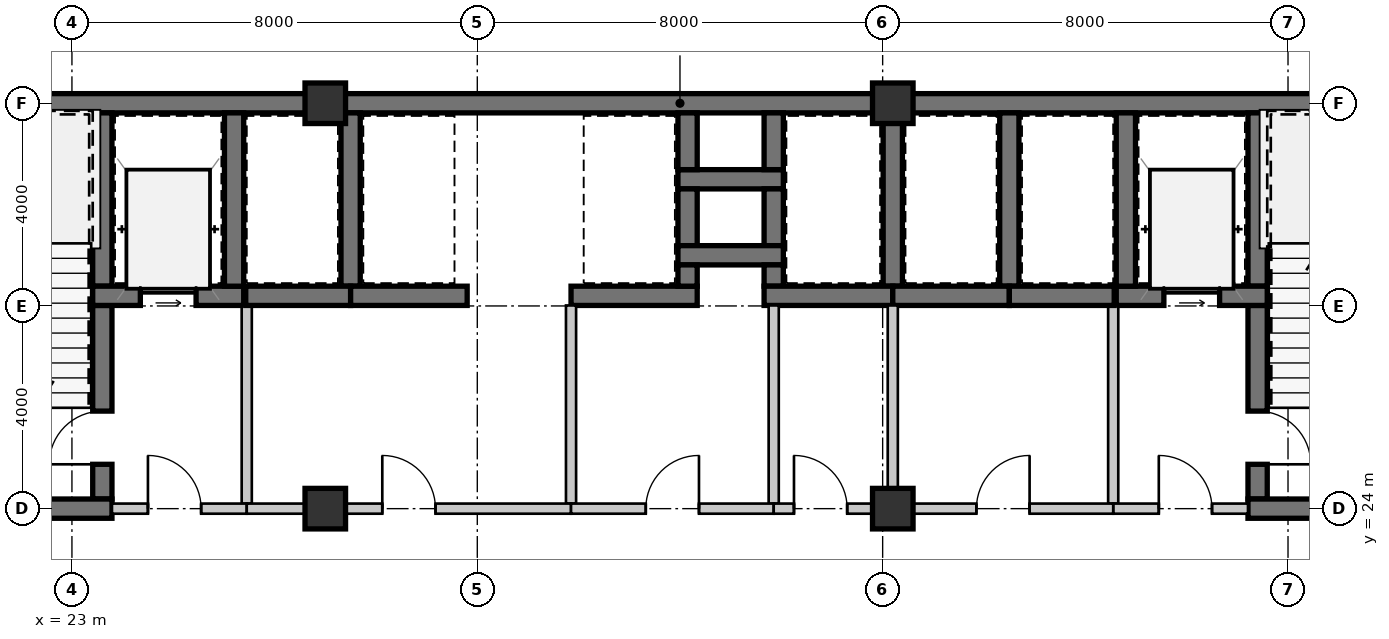
"""IFC4 building model, lengths in metres.
Left out: names, types, materials, properties, quantities, classifications, styles, units other than length and angle.
Written with IfcOpenShell. Run it as: python <this file> out.ifc"""

import sys

from ifc_helpers import new_model, si_unit, direction, frame, frame_2d, origin, origin_2d, place, context, subcontext, project, spatial, rectangle, extrude, source, transform, mapped, element, fill, save


model = new_model("IFC4")
c1 = context("Model", 3, precision=1e-05, world=origin(), true_north=direction((0.0, 1.0)))
c2 = subcontext(c1, "Body", "Model", "MODEL_VIEW")
j1 = project(units=[si_unit("LENGTHUNIT", "METRE"), si_unit("PLANEANGLEUNIT", "RADIAN")], contexts=[c1])
p1 = place(None, origin())
s1 = spatial("IfcSite", under=j1, at=p1, CompositionType="ELEMENT")
p2 = place(p1, origin())
s2 = spatial("IfcBuilding", under=s1, at=p2, CompositionType="ELEMENT")
p3 = place(p2, frame((0.0, 0.0, 60.9)))
s3 = spatial("IfcBuildingStorey", under=s2, at=p3, CompositionType="ELEMENT", Elevation=60.9)
m1 = source(origin(), c2, "Body", "SweptSolid", [
    extrude(rectangle(XDim=0.8, YDim=0.8, at=origin_2d()), origin(), (0.0, 0.0, 1.0), 4.2),
])
for number, where, z_axis, x_axis in (
    (1, (28.0, 24.0, 0.0), (0.0, 0.0, 1.0), (1.0, 0.0, 0.0)),
    (2, (39.2, 24.0, 0.0), (0.0, 0.0, 1.0), (1.0, 0.0, 0.0)),
    (3, (28.0, 32.0, 0.0), (0.0, 0.0, 1.0), (1.0, 0.0, 0.0)),
    (4, (39.2, 32.0, 0.0), (0.0, 0.0, 1.0), (1.0, 0.0, 0.0)),
):
    element("IfcColumn", number, at=place(p3, frame(where, z_axis=z_axis, x_axis=x_axis)), inside=s3, PredefinedType="COLUMN", context=c2, shape_type="MappedRepresentation", body=[
        mapped(m1, transform((0.0, 0.0, 0.0), scale=1.0)),
    ])
m2 = source(origin(), c2, "Body", "SweptSolid", [
    extrude(rectangle(XDim=9.19, YDim=0.38, at=frame_2d((4.595, 0.0))), origin(), (0.0, 0.0, 1.0), 3.78),
])
p4 = place(p3, frame((18.81, 32.0, 0.0), z_axis=(0.0, 0.0, 1.0), x_axis=(1.0, 0.0, 0.0)))
e5 = element("IfcWall", 5, at=p4, inside=s3, PredefinedType="SHEAR", context=c2, shape_type="MappedRepresentation", body=[
    mapped(m2, transform((0.0, 0.0, 0.0), scale=1.0)),
])
m3 = source(origin(), c2, "Body", "SweptSolid", [
    extrude(rectangle(XDim=11.2, YDim=0.38, at=frame_2d((5.6, 0.0))), origin(), (0.0, 0.0, 1.0), 3.78),
])
p5 = place(p3, frame((28.0, 32.0, 0.0), z_axis=(0.0, 0.0, 1.0), x_axis=(1.0, 0.0, 0.0)))
e6 = element("IfcWall", 6, at=p5, inside=s3, PredefinedType="SHEAR", context=c2, shape_type="MappedRepresentation", body=[
    mapped(m3, transform((0.0, 0.0, 0.0), scale=1.0)),
])
m4 = source(origin(), c2, "Body", "SweptSolid", [
    extrude(rectangle(XDim=11.99, YDim=0.38, at=frame_2d((5.995, 0.0))), origin(), (0.0, 0.0, 1.0), 3.78),
])
p6 = place(p3, frame((39.2, 32.0, 0.0), z_axis=(0.0, 0.0, 1.0), x_axis=(1.0, 0.0, 0.0)))
e7 = element("IfcWall", 7, at=p6, inside=s3, PredefinedType="SHEAR", context=c2, shape_type="MappedRepresentation", body=[
    mapped(m4, transform((0.0, 0.0, 0.0), scale=1.0)),
])
m5 = source(origin(), c2, "Body", "SweptSolid", [
    extrude(rectangle(XDim=3.42, YDim=0.38, at=frame_2d((1.71, 0.0))), origin(), (0.0, 0.0, 1.0), 3.78),
])
p7 = place(p3, frame((23.6, 28.39, 0.0), z_axis=(0.0, 0.0, 1.0), x_axis=(0.0, 1.0, 0.0)))
e8 = element("IfcWall", 8, at=p7, inside=s3, PredefinedType="SHEAR", context=c2, shape_type="MappedRepresentation", body=[
    mapped(m5, transform((0.0, 0.0, 0.0), scale=1.0)),
])
m6 = source(origin(), c2, "Body", "SweptSolid", [
    extrude(rectangle(XDim=3.82, YDim=0.38, at=frame_2d((1.91, 0.0))), origin(), (0.0, 0.0, 1.0), 3.78),
])
p8 = place(p3, frame((23.6, 24.19, 0.0), z_axis=(0.0, 0.0, 1.0), x_axis=(0.0, 1.0, 0.0)))
e9 = element("IfcWall", 9, at=p8, inside=s3, PredefinedType="SHEAR", context=c2, shape_type="MappedRepresentation", body=[
    mapped(m6, transform((0.0, 0.0, 0.0), scale=1.0)),
])
m7 = source(origin(), c2, "Body", "SweptSolid", [
    extrude(rectangle(XDim=1.05, YDim=2.1, at=frame_2d((0.525, 1.05))), frame((0.0, 0.2, 0.0), z_axis=(0.0, -1.0, 0.0), x_axis=(1.0, 0.0, 0.0)), (0.0, 0.0, 1.0), 0.4),
])
p9 = place(p8, frame((0.685, 0.0, 0.0)))
e10 = element("IfcOpeningElement", 10, at=p9, cuts=e9, PredefinedType="OPENING", context=c2, shape_type="MappedRepresentation", body=[
    mapped(m7, transform((0.0, 0.0, 0.0), scale=1.0)),
])
m8 = source(origin(), c2, "Body", "SweptSolid", [
    extrude(rectangle(XDim=4.98, YDim=0.38, at=frame_2d((2.49, 0.0))), origin(), (0.0, 0.0, 1.0), 3.78),
])
p10 = place(p3, frame((18.81, 24.0, 0.0), z_axis=(0.0, 0.0, 1.0), x_axis=(1.0, 0.0, 0.0)))
e11 = element("IfcWall", 11, at=p10, inside=s3, PredefinedType="SHEAR", context=c2, shape_type="MappedRepresentation", body=[
    mapped(m8, transform((0.0, 0.0, 0.0), scale=1.0)),
])
m9 = source(origin(), c2, "Body", "SweptSolid", [
    extrude(rectangle(XDim=2.98, YDim=0.38, at=frame_2d((1.49, 0.0))), origin(), (0.0, 0.0, 1.0), 3.78),
])
p11 = place(p3, frame((23.41, 28.2, 0.0), z_axis=(0.0, 0.0, 1.0), x_axis=(1.0, 0.0, 0.0)))
e12 = element("IfcWall", 12, at=p11, inside=s3, PredefinedType="SHEAR", context=c2, shape_type="MappedRepresentation", body=[
    mapped(m9, transform((0.0, 0.0, 0.0), scale=1.0)),
])
m10 = source(origin(), c2, "Body", "SweptSolid", [
    extrude(rectangle(XDim=1.1, YDim=2.15, at=frame_2d((0.55, 1.075))), frame((0.0, 0.2, 0.0), z_axis=(0.0, -1.0, 0.0), x_axis=(1.0, 0.0, 0.0)), (0.0, 0.0, 1.0), 0.4),
])
p12 = place(p11, frame((0.94, 0.0, 0.0)))
e13 = element("IfcOpeningElement", 13, at=p12, cuts=e12, PredefinedType="OPENING", context=c2, shape_type="MappedRepresentation", body=[
    mapped(m10, transform((0.0, 0.0, 0.0), scale=1.0)),
])
p13 = place(p3, frame((26.2, 28.39, 0.0), z_axis=(0.0, 0.0, 1.0), x_axis=(0.0, 1.0, 0.0)))
e14 = element("IfcWall", 14, at=p13, inside=s3, PredefinedType="SHEAR", context=c2, shape_type="MappedRepresentation", body=[
    mapped(m5, transform((0.0, 0.0, 0.0), scale=1.0)),
])
m11 = source(origin(), c2, "Body", "SweptSolid", [
    extrude(rectangle(XDim=3.91, YDim=0.2, at=frame_2d((1.955, 0.0))), origin(), (0.0, 0.0, 1.0), 3.78),
])
p14 = place(p3, frame((26.45, 24.1, 0.0), z_axis=(0.0, 0.0, 1.0), x_axis=(0.0, 1.0, 0.0)))
e15 = element("IfcWall", 15, at=p14, inside=s3, PredefinedType="SOLIDWALL", context=c2, shape_type="MappedRepresentation", body=[
    mapped(m11, transform((0.0, 0.0, 0.0), scale=1.0)),
])
m12 = source(origin(), c2, "Body", "SweptSolid", [
    extrude(rectangle(XDim=2.66, YDim=0.2, at=frame_2d((1.33, 0.0))), origin(), (0.0, 0.0, 1.0), 3.32),
])
p15 = place(p3, frame((23.79, 24.0, 0.0), z_axis=(0.0, 0.0, 1.0), x_axis=(1.0, 0.0, 0.0)))
e16 = element("IfcWall", 16, at=p15, inside=s3, PredefinedType="SOLIDWALL", context=c2, shape_type="MappedRepresentation", body=[
    mapped(m12, transform((0.0, 0.0, 0.0), scale=1.0)),
])
m13 = source(origin(), c2, "Body", "SweptSolid", [
    extrude(rectangle(XDim=1.05, YDim=2.1, at=frame_2d((0.525, 1.05))), frame((0.0, 0.11, 0.0), z_axis=(0.0, -1.0, 0.0), x_axis=(1.0, 0.0, 0.0)), (0.0, 0.0, 1.0), 0.22),
])
p16 = place(p15, frame((0.71, 0.0, 0.0)))
e17 = element("IfcOpeningElement", 17, at=p16, cuts=e16, PredefinedType="OPENING", context=c2, shape_type="MappedRepresentation", body=[
    mapped(m13, transform((0.0, 0.0, 0.0), scale=1.0)),
])
p17 = place(p3, frame((46.4, 31.81, 0.0), z_axis=(0.0, 0.0, 1.0), x_axis=(0.0, -1.0, 0.0)))
e18 = element("IfcWall", 18, at=p17, inside=s3, PredefinedType="SHEAR", context=c2, shape_type="MappedRepresentation", body=[
    mapped(m5, transform((0.0, 0.0, 0.0), scale=1.0)),
])
p18 = place(p3, frame((46.4, 28.01, 0.0), z_axis=(0.0, 0.0, 1.0), x_axis=(0.0, -1.0, 0.0)))
e19 = element("IfcWall", 19, at=p18, inside=s3, PredefinedType="SHEAR", context=c2, shape_type="MappedRepresentation", body=[
    mapped(m6, transform((0.0, 0.0, 0.0), scale=1.0)),
])
p19 = place(p18, frame((2.085, 0.0, 0.0)))
e20 = element("IfcOpeningElement", 20, at=p19, cuts=e19, PredefinedType="OPENING", context=c2, shape_type="MappedRepresentation", body=[
    mapped(m7, transform((0.0, 0.0, 0.0), scale=1.0)),
])
p20 = place(p3, frame((46.21, 24.0, 0.0), z_axis=(0.0, 0.0, 1.0), x_axis=(1.0, 0.0, 0.0)))
e21 = element("IfcWall", 21, at=p20, inside=s3, PredefinedType="SHEAR", context=c2, shape_type="MappedRepresentation", body=[
    mapped(m8, transform((0.0, 0.0, 0.0), scale=1.0)),
])
p21 = place(p3, frame((43.61, 28.2, 0.0), z_axis=(0.0, 0.0, 1.0), x_axis=(1.0, 0.0, 0.0)))
e22 = element("IfcWall", 22, at=p21, inside=s3, PredefinedType="SHEAR", context=c2, shape_type="MappedRepresentation", body=[
    mapped(m9, transform((0.0, 0.0, 0.0), scale=1.0)),
])
p22 = place(p21, frame((0.94, 0.0, 0.0)))
e23 = element("IfcOpeningElement", 23, at=p22, cuts=e22, PredefinedType="OPENING", context=c2, shape_type="MappedRepresentation", body=[
    mapped(m10, transform((0.0, 0.0, 0.0), scale=1.0)),
])
p23 = place(p3, frame((43.8, 31.81, 0.0), z_axis=(0.0, 0.0, 1.0), x_axis=(0.0, -1.0, 0.0)))
e24 = element("IfcWall", 24, at=p23, inside=s3, PredefinedType="SHEAR", context=c2, shape_type="MappedRepresentation", body=[
    mapped(m5, transform((0.0, 0.0, 0.0), scale=1.0)),
])
p24 = place(p3, frame((43.55, 28.01, 0.0), z_axis=(0.0, 0.0, 1.0), x_axis=(0.0, -1.0, 0.0)))
e25 = element("IfcWall", 25, at=p24, inside=s3, PredefinedType="SOLIDWALL", context=c2, shape_type="MappedRepresentation", body=[
    mapped(m11, transform((0.0, 0.0, 0.0), scale=1.0)),
])
m14 = source(origin(), c2, "Body", "SweptSolid", [
    extrude(rectangle(XDim=2.66, YDim=0.2, at=frame_2d((1.33, 0.0))), origin(), (0.0, 0.0, 1.0), 3.247),
])
p25 = place(p3, frame((43.55, 24.0, 0.0), z_axis=(0.0, 0.0, 1.0), x_axis=(1.0, 0.0, 0.0)))
e26 = element("IfcWall", 26, at=p25, inside=s3, PredefinedType="SOLIDWALL", context=c2, shape_type="MappedRepresentation", body=[
    mapped(m14, transform((0.0, 0.0, 0.0), scale=1.0)),
])
p26 = place(p25, frame((0.9, 0.0, 0.0)))
e27 = element("IfcOpeningElement", 27, at=p26, cuts=e26, PredefinedType="OPENING", context=c2, shape_type="MappedRepresentation", body=[
    mapped(m13, transform((0.0, 0.0, 0.0), scale=1.0)),
])
m15 = source(origin(), c2, "Body", "SweptSolid", [
    extrude(rectangle(XDim=2.08, YDim=0.38, at=frame_2d((1.04, 0.0))), origin(), (0.0, 0.0, 1.0), 3.78),
])
p27 = place(p3, frame((34.96, 30.5, 0.0), z_axis=(0.0, 0.0, 1.0), x_axis=(1.0, 0.0, 0.0)))
e28 = element("IfcWall", 28, at=p27, inside=s3, PredefinedType="SHEAR", context=c2, shape_type="MappedRepresentation", body=[
    mapped(m15, transform((0.0, 0.0, 0.0), scale=1.0)),
])
m16 = source(origin(), c2, "Body", "SweptSolid", [
    extrude(rectangle(XDim=1.12, YDim=0.38, at=frame_2d((0.56, 0.0))), origin(), (0.0, 0.0, 1.0), 3.78),
])
for number, where, z_axis, x_axis in (
    (29, (35.15, 31.81, 0.0), (0.0, 0.0, 1.0), (0.0, -1.0, 0.0)),
    (30, (36.85, 30.69, 0.0), (0.0, 0.0, 1.0), (0.0, 1.0, 0.0)),
    (31, (35.15, 30.31, 0.0), (0.0, 0.0, 1.0), (0.0, -1.0, 0.0)),
    (32, (36.85, 29.19, 0.0), (0.0, 0.0, 1.0), (0.0, 1.0, 0.0)),
):
    element("IfcWall", number, at=place(p3, frame(where, z_axis=z_axis, x_axis=x_axis)), inside=s3, PredefinedType="SHEAR", context=c2, shape_type="MappedRepresentation", body=[
        mapped(m16, transform((0.0, 0.0, 0.0), scale=1.0)),
    ])
p28 = place(p3, frame((34.96, 29.0, 0.0), z_axis=(0.0, 0.0, 1.0), x_axis=(1.0, 0.0, 0.0)))
e33 = element("IfcWall", 33, at=p28, inside=s3, PredefinedType="SHEAR", context=c2, shape_type="MappedRepresentation", body=[
    mapped(m15, transform((0.0, 0.0, 0.0), scale=1.0)),
])
p29 = place(p3, frame((28.5, 28.39, 0.0), z_axis=(0.0, 0.0, 1.0), x_axis=(0.0, 1.0, 0.0)))
e34 = element("IfcWall", 34, at=p29, inside=s3, PredefinedType="SHEAR", context=c2, shape_type="MappedRepresentation", body=[
    mapped(m5, transform((0.0, 0.0, 0.0), scale=1.0)),
])
m17 = source(origin(), c2, "Body", "SweptSolid", [
    extrude(rectangle(XDim=2.07, YDim=0.38, at=frame_2d((1.035, 0.0))), origin(), (0.0, 0.0, 1.0), 3.78),
])
p30 = place(p3, frame((26.43, 28.2, 0.0), z_axis=(0.0, 0.0, 1.0), x_axis=(1.0, 0.0, 0.0)))
e35 = element("IfcWall", 35, at=p30, inside=s3, PredefinedType="SHEAR", context=c2, shape_type="MappedRepresentation", body=[
    mapped(m17, transform((0.0, 0.0, 0.0), scale=1.0)),
])
m18 = source(origin(), c2, "Body", "SweptSolid", [
    extrude(rectangle(XDim=2.3, YDim=0.38, at=frame_2d((1.15, 0.0))), origin(), (0.0, 0.0, 1.0), 3.78),
])
p31 = place(p3, frame((28.5, 28.2, 0.0), z_axis=(0.0, 0.0, 1.0), x_axis=(1.0, 0.0, 0.0)))
e36 = element("IfcWall", 36, at=p31, inside=s3, PredefinedType="SHEAR", context=c2, shape_type="MappedRepresentation", body=[
    mapped(m18, transform((0.0, 0.0, 0.0), scale=1.0)),
])
m19 = source(origin(), c2, "Body", "SweptSolid", [
    extrude(rectangle(XDim=2.49, YDim=0.38, at=frame_2d((1.245, 0.0))), origin(), (0.0, 0.0, 1.0), 3.78),
])
p32 = place(p3, frame((32.85, 28.2, 0.0), z_axis=(0.0, 0.0, 1.0), x_axis=(1.0, 0.0, 0.0)))
e37 = element("IfcWall", 37, at=p32, inside=s3, PredefinedType="SHEAR", context=c2, shape_type="MappedRepresentation", body=[
    mapped(m19, transform((0.0, 0.0, 0.0), scale=1.0)),
])
m20 = source(origin(), c2, "Body", "SweptSolid", [
    extrude(rectangle(XDim=0.42, YDim=0.38, at=frame_2d((0.21, 0.0))), origin(), (0.0, 0.0, 1.0), 3.78),
])
p33 = place(p3, frame((35.15, 28.39, 0.0), z_axis=(0.0, 0.0, 1.0), x_axis=(0.0, 1.0, 0.0)))
e38 = element("IfcWall", 38, at=p33, inside=s3, PredefinedType="SHEAR", context=c2, shape_type="MappedRepresentation", body=[
    mapped(m20, transform((0.0, 0.0, 0.0), scale=1.0)),
])
p34 = place(p3, frame((39.2, 28.39, 0.0), z_axis=(0.0, 0.0, 1.0), x_axis=(0.0, 1.0, 0.0)))
e39 = element("IfcWall", 39, at=p34, inside=s3, PredefinedType="SHEAR", context=c2, shape_type="MappedRepresentation", body=[
    mapped(m5, transform((0.0, 0.0, 0.0), scale=1.0)),
])
p35 = place(p3, frame((36.85, 28.81, 0.0), z_axis=(0.0, 0.0, 1.0), x_axis=(0.0, -1.0, 0.0)))
e40 = element("IfcWall", 40, at=p35, inside=s3, PredefinedType="SHEAR", context=c2, shape_type="MappedRepresentation", body=[
    mapped(m20, transform((0.0, 0.0, 0.0), scale=1.0)),
])
m21 = source(origin(), c2, "Body", "SweptSolid", [
    extrude(rectangle(XDim=2.54, YDim=0.38, at=frame_2d((1.27, 0.0))), origin(), (0.0, 0.0, 1.0), 3.78),
])
p36 = place(p3, frame((36.66, 28.2, 0.0), z_axis=(0.0, 0.0, 1.0), x_axis=(1.0, 0.0, 0.0)))
e41 = element("IfcWall", 41, at=p36, inside=s3, PredefinedType="SHEAR", context=c2, shape_type="MappedRepresentation", body=[
    mapped(m21, transform((0.0, 0.0, 0.0), scale=1.0)),
])
p37 = place(p3, frame((41.5, 28.39, 0.0), z_axis=(0.0, 0.0, 1.0), x_axis=(0.0, 1.0, 0.0)))
e42 = element("IfcWall", 42, at=p37, inside=s3, PredefinedType="SHEAR", context=c2, shape_type="MappedRepresentation", body=[
    mapped(m5, transform((0.0, 0.0, 0.0), scale=1.0)),
])
p38 = place(p3, frame((39.2, 28.2, 0.0), z_axis=(0.0, 0.0, 1.0), x_axis=(1.0, 0.0, 0.0)))
e43 = element("IfcWall", 43, at=p38, inside=s3, PredefinedType="SHEAR", context=c2, shape_type="MappedRepresentation", body=[
    mapped(m18, transform((0.0, 0.0, 0.0), scale=1.0)),
])
p39 = place(p3, frame((41.5, 28.2, 0.0), z_axis=(0.0, 0.0, 1.0), x_axis=(1.0, 0.0, 0.0)))
e44 = element("IfcWall", 44, at=p39, inside=s3, PredefinedType="SHEAR", context=c2, shape_type="MappedRepresentation", body=[
    mapped(m17, transform((0.0, 0.0, 0.0), scale=1.0)),
])
p40 = place(p3, frame((32.85, 28.01, 0.0), z_axis=(0.0, 0.0, 1.0), x_axis=(0.0, -1.0, 0.0)))
e45 = element("IfcWall", 45, at=p40, inside=s3, PredefinedType="SOLIDWALL", context=c2, shape_type="MappedRepresentation", body=[
    mapped(m11, transform((0.0, 0.0, 0.0), scale=1.0)),
])
m22 = source(origin(), c2, "Body", "SweptSolid", [
    extrude(rectangle(XDim=6.4, YDim=0.2, at=frame_2d((3.2, 0.0))), origin(), (0.0, 0.0, 1.0), 3.32),
])
p41 = place(p3, frame((32.85, 24.0, 0.0), z_axis=(0.0, 0.0, 1.0), x_axis=(-1.0, 0.0, 0.0)))
e46 = element("IfcWall", 46, at=p41, inside=s3, PredefinedType="SOLIDWALL", context=c2, shape_type="MappedRepresentation", body=[
    mapped(m22, transform((0.0, 0.0, 0.0), scale=1.0)),
])
p42 = place(p41, frame((2.675, 0.0, 0.0)))
e47 = element("IfcOpeningElement", 47, at=p42, cuts=e46, PredefinedType="OPENING", context=c2, shape_type="MappedRepresentation", body=[
    mapped(m13, transform((0.0, 0.0, 0.0), scale=1.0)),
])
p43 = place(p3, frame((36.85, 28.01, 0.0), z_axis=(0.0, 0.0, 1.0), x_axis=(0.0, -1.0, 0.0)))
e48 = element("IfcWall", 48, at=p43, inside=s3, PredefinedType="SOLIDWALL", context=c2, shape_type="MappedRepresentation", body=[
    mapped(m11, transform((0.0, 0.0, 0.0), scale=1.0)),
])
m23 = source(origin(), c2, "Body", "SweptSolid", [
    extrude(rectangle(XDim=4.0, YDim=0.2, at=frame_2d((2.0, 0.0))), origin(), (0.0, 0.0, 1.0), 3.32),
])
p44 = place(p3, frame((36.85, 24.0, 0.0), z_axis=(0.0, 0.0, 1.0), x_axis=(-1.0, 0.0, 0.0)))
e49 = element("IfcWall", 49, at=p44, inside=s3, PredefinedType="SOLIDWALL", context=c2, shape_type="MappedRepresentation", body=[
    mapped(m23, transform((0.0, 0.0, 0.0), scale=1.0)),
])
p45 = place(p44, frame((1.475, 0.0, 0.0)))
e50 = element("IfcOpeningElement", 50, at=p45, cuts=e49, PredefinedType="OPENING", context=c2, shape_type="MappedRepresentation", body=[
    mapped(m13, transform((0.0, 0.0, 0.0), scale=1.0)),
])
m24 = source(origin(), c2, "Body", "SweptSolid", [
    extrude(rectangle(XDim=3.91, YDim=0.2, at=frame_2d((1.955, 0.0))), origin(), (0.0, 0.0, 1.0), 3.32),
])
p46 = place(p3, frame((39.2, 28.01, 0.0), z_axis=(0.0, 0.0, 1.0), x_axis=(0.0, -1.0, 0.0)))
e51 = element("IfcWall", 51, at=p46, inside=s3, PredefinedType="SOLIDWALL", context=c2, shape_type="MappedRepresentation", body=[
    mapped(m24, transform((0.0, 0.0, 0.0), scale=1.0)),
])
m25 = source(origin(), c2, "Body", "SweptSolid", [
    extrude(rectangle(XDim=2.35, YDim=0.2, at=frame_2d((1.175, 0.0))), origin(), (0.0, 0.0, 1.0), 3.32),
])
p47 = place(p3, frame((39.2, 24.0, 0.0), z_axis=(0.0, 0.0, 1.0), x_axis=(-1.0, 0.0, 0.0)))
e52 = element("IfcWall", 52, at=p47, inside=s3, PredefinedType="SOLIDWALL", context=c2, shape_type="MappedRepresentation", body=[
    mapped(m25, transform((0.0, 0.0, 0.0), scale=1.0)),
])
p48 = place(p47, frame((0.9, 0.0, 0.0)))
e53 = element("IfcOpeningElement", 53, at=p48, cuts=e52, PredefinedType="OPENING", context=c2, shape_type="MappedRepresentation", body=[
    mapped(m13, transform((0.0, 0.0, 0.0), scale=1.0)),
])
m26 = source(origin(), c2, "Body", "SweptSolid", [
    extrude(rectangle(XDim=4.35, YDim=0.2, at=frame_2d((2.175, 0.0))), origin(), (0.0, 0.0, 1.0), 3.247),
])
p49 = place(p3, frame((43.55, 24.0, 0.0), z_axis=(0.0, 0.0, 1.0), x_axis=(-1.0, 0.0, 0.0)))
e54 = element("IfcWall", 54, at=p49, inside=s3, PredefinedType="SOLIDWALL", context=c2, shape_type="MappedRepresentation", body=[
    mapped(m26, transform((0.0, 0.0, 0.0), scale=1.0)),
])
p50 = place(p49, frame((1.65, 0.0, 0.0)))
e55 = element("IfcOpeningElement", 55, at=p50, cuts=e54, PredefinedType="OPENING", context=c2, shape_type="MappedRepresentation", body=[
    mapped(m13, transform((0.0, 0.0, 0.0), scale=1.0)),
])
m27 = source(origin(), c2, "Body", "SweptSolid", [
    extrude(rectangle(XDim=1.05, YDim=2.1, at=frame_2d((0.525, 1.05))), frame((0.0, 0.025, 0.0), z_axis=(0.0, -1.0, 0.0), x_axis=(1.0, 0.0, 0.0)), (0.0, 0.0, 1.0), 0.05),
])
p51 = place(p9, origin())
e56 = element("IfcDoor", 56, at=p51, inside=s3, OperationType="SINGLE_SWING_LEFT", PredefinedType="DOOR", context=c2, shape_type="MappedRepresentation", body=[
    mapped(m27, transform((0.0, 0.0, 0.0), scale=1.0)),
])
fill(e10, e56)
m28 = source(origin(), c2, "Body", "SweptSolid", [
    extrude(rectangle(XDim=1.1, YDim=2.15, at=frame_2d((0.55, 1.075))), frame((0.0, 0.025, 0.0), z_axis=(0.0, -1.0, 0.0), x_axis=(1.0, 0.0, 0.0)), (0.0, 0.0, 1.0), 0.05),
])
p52 = place(p12, origin())
e57 = element("IfcDoor", 57, at=p52, inside=s3, OperationType="SLIDING_TO_LEFT", PredefinedType="DOOR", context=c2, shape_type="MappedRepresentation", body=[
    mapped(m28, transform((0.0, 0.0, 0.0), scale=1.0)),
])
fill(e13, e57)
p53 = place(p16, origin())
e58 = element("IfcDoor", 58, at=p53, inside=s3, OperationType="SINGLE_SWING_LEFT", PredefinedType="DOOR", context=c2, shape_type="MappedRepresentation", body=[
    mapped(m27, transform((0.0, 0.0, 0.0), scale=1.0)),
])
fill(e17, e58)
p54 = place(p19, origin())
e59 = element("IfcDoor", 59, at=p54, inside=s3, OperationType="SINGLE_SWING_RIGHT", PredefinedType="DOOR", context=c2, shape_type="MappedRepresentation", body=[
    mapped(m27, transform((0.0, 0.0, 0.0), scale=1.0)),
])
fill(e20, e59)
p55 = place(p22, origin())
e60 = element("IfcDoor", 60, at=p55, inside=s3, OperationType="SLIDING_TO_LEFT", PredefinedType="DOOR", context=c2, shape_type="MappedRepresentation", body=[
    mapped(m28, transform((0.0, 0.0, 0.0), scale=1.0)),
])
fill(e23, e60)
p56 = place(p26, origin())
e61 = element("IfcDoor", 61, at=p56, inside=s3, OperationType="SINGLE_SWING_LEFT", PredefinedType="DOOR", context=c2, shape_type="MappedRepresentation", body=[
    mapped(m27, transform((0.0, 0.0, 0.0), scale=1.0)),
])
fill(e27, e61)
p57 = place(p42, frame((1.05, 0.0, 0.0), z_axis=(0.0, 0.0, 1.0), x_axis=(-1.0, 0.0, 0.0)))
e62 = element("IfcDoor", 62, at=p57, inside=s3, OperationType="SINGLE_SWING_LEFT", PredefinedType="DOOR", context=c2, shape_type="MappedRepresentation", body=[
    mapped(m27, transform((0.0, 0.0, 0.0), scale=1.0)),
])
fill(e47, e62)
p58 = place(p45, frame((1.05, 0.0, 0.0), z_axis=(0.0, 0.0, 1.0), x_axis=(-1.0, 0.0, 0.0)))
e63 = element("IfcDoor", 63, at=p58, inside=s3, OperationType="SINGLE_SWING_RIGHT", PredefinedType="DOOR", context=c2, shape_type="MappedRepresentation", body=[
    mapped(m27, transform((0.0, 0.0, 0.0), scale=1.0)),
])
fill(e50, e63)
p59 = place(p48, frame((1.05, 0.0, 0.0), z_axis=(0.0, 0.0, 1.0), x_axis=(-1.0, 0.0, 0.0)))
e64 = element("IfcDoor", 64, at=p59, inside=s3, OperationType="SINGLE_SWING_LEFT", PredefinedType="DOOR", context=c2, shape_type="MappedRepresentation", body=[
    mapped(m27, transform((0.0, 0.0, 0.0), scale=1.0)),
])
fill(e53, e64)
p60 = place(p50, frame((1.05, 0.0, 0.0), z_axis=(0.0, 0.0, 1.0), x_axis=(-1.0, 0.0, 0.0)))
e65 = element("IfcDoor", 65, at=p60, inside=s3, OperationType="SINGLE_SWING_RIGHT", PredefinedType="DOOR", context=c2, shape_type="MappedRepresentation", body=[
    mapped(m27, transform((0.0, 0.0, 0.0), scale=1.0)),
])
fill(e55, e65)
save(model, sys.argv[1])
